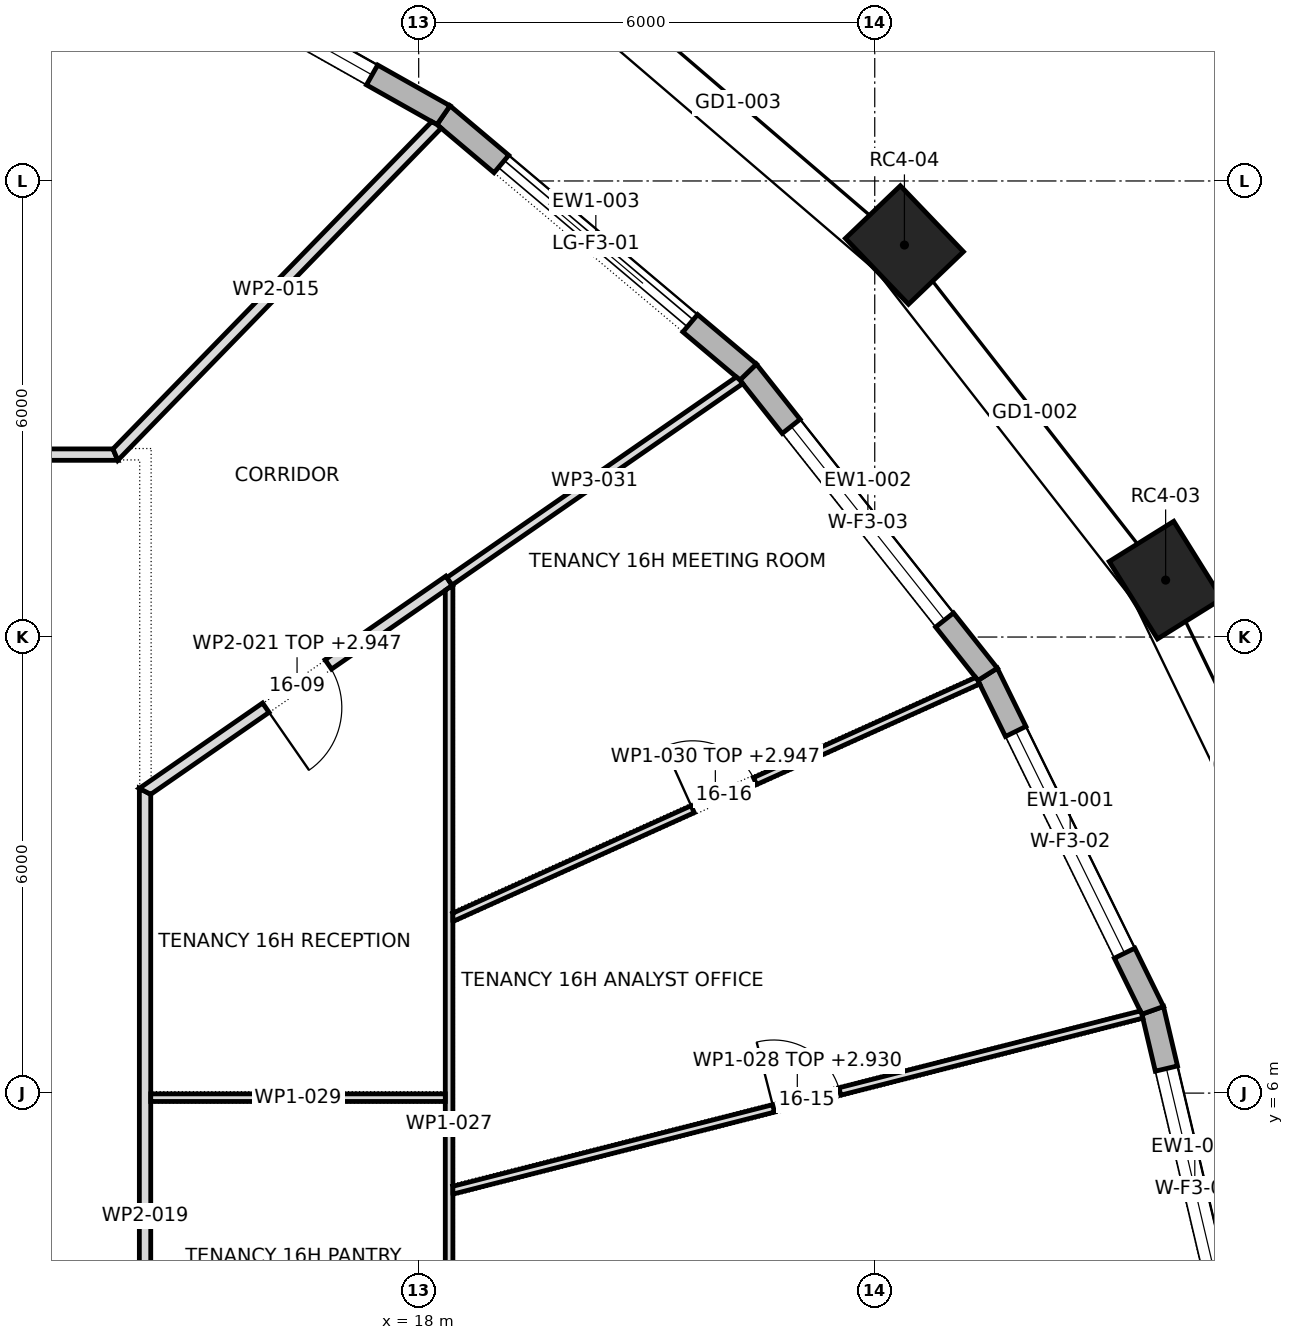
"""IFC4 building model, lengths in metres.
Left out: names, types, materials, properties, quantities, classifications, styles, units other than length and angle.
Written with IfcOpenShell. Run it as: python <this file> out.ifc"""

import sys

from ifc_helpers import new_model, si_unit, direction, frame, frame_2d, origin, origin_2d, place, context, subcontext, project, spatial, polyline, rectangle, outline, extrude, element, fill, save


model = new_model("IFC4")
c1 = context("Model", 3, precision=1e-05, world=origin(), true_north=direction((0.0, 1.0)))
c2 = subcontext(c1, "Body", "Model", "MODEL_VIEW")
j1 = project(units=[si_unit("LENGTHUNIT", "METRE"), si_unit("PLANEANGLEUNIT", "RADIAN")], contexts=[c1])
p1 = place(None, origin())
s1 = spatial("IfcSite", under=j1, at=p1, CompositionType="ELEMENT")
p2 = place(p1, origin())
s2 = spatial("IfcBuilding", under=s1, at=p2, CompositionType="ELEMENT")
p3 = place(p2, frame((0.0, 0.0, 226.9)))
s3 = spatial("IfcBuildingStorey", under=s2, at=p3, CompositionType="ELEMENT", Elevation=226.9)
for number, where, z_axis, x_axis in (
    (1, (27.827, 12.749, 0.0), (0.0, 0.0, 1.0), (-0.529, 0.849, 0.0)),
    (2, (24.39, 17.157, 0.0), (0.0, 0.0, 1.0), (-0.692, 0.722, 0.0)),
):
    element("IfcColumn", number, at=place(p3, frame(where, z_axis=z_axis, x_axis=x_axis)), inside=s3, PredefinedType="COLUMN", context=c2, shape_type="SweptSolid", body=[
        extrude(rectangle(XDim=1.2, YDim=1.0, at=origin_2d()), origin(), (0.0, 0.0, 1.0), 4.0),
    ])
p4 = place(p3, frame((28.764, 2.394, 0.0), z_axis=(0.0, 0.0, 1.0), x_axis=(-0.229617574796, 0.97328093033, 0.0)))
e3 = element("IfcWall", 3, at=p4, inside=s3, PredefinedType="STANDARD", context=c2, shape_type="SweptSolid", body=[
    extrude(outline(polyline([(-0.017, -0.15), (4.841, -0.15), (4.807, 0.15), (0.017, 0.15), (-0.017, -0.15)])), origin(), (0.0, 0.0, 1.0), 3.7),
])
p5 = place(p4, frame((0.787, 0.0, 0.6)))
e4 = element("IfcOpeningElement", 4, at=p5, cuts=e3, PredefinedType="OPENING", context=c2, shape_type="SweptSolid", body=[
    extrude(rectangle(XDim=3.25, YDim=2.65, at=frame_2d((1.625, 1.325))), frame((0.0, 0.162, 0.0), z_axis=(0.0, -1.0, 0.0), x_axis=(1.0, 0.0, 0.0)), (0.0, 0.0, 1.0), 0.324),
])
p6 = place(p3, frame((27.656, 7.089, 0.0), z_axis=(0.0, 0.0, 1.0), x_axis=(-0.440857641837, 0.897577038272, 0.0)))
e5 = element("IfcWall", 5, at=p6, inside=s3, PredefinedType="STANDARD", context=c2, shape_type="SweptSolid", body=[
    extrude(outline(polyline([(-0.017, -0.15), (4.941, -0.15), (4.909, 0.15), (0.017, 0.15), (-0.017, -0.15)])), origin(), (0.0, 0.0, 1.0), 3.7),
])
p7 = place(p6, frame((0.838, 0.0, 0.6)))
e6 = element("IfcOpeningElement", 6, at=p7, cuts=e5, PredefinedType="OPENING", context=c2, shape_type="SweptSolid", body=[
    extrude(rectangle(XDim=3.25, YDim=2.65, at=frame_2d((1.625, 1.325))), frame((0.0, 0.162, 0.0), z_axis=(0.0, -1.0, 0.0), x_axis=(1.0, 0.0, 0.0)), (0.0, 0.0, 1.0), 0.324),
])
p8 = place(p3, frame((25.485, 11.51, 0.0), z_axis=(0.0, 0.0, 1.0), x_axis=(-0.621084984443, 0.783743224596, 0.0)))
e7 = element("IfcWall", 7, at=p8, inside=s3, PredefinedType="STANDARD", context=c2, shape_type="SweptSolid", body=[
    extrude(outline(polyline([(-0.016, -0.15), (5.088, -0.15), (5.058, 0.15), (0.016, 0.15), (-0.016, -0.15)])), origin(), (0.0, 0.0, 1.0), 3.7),
])
p9 = place(p8, frame((0.912, 0.0, 0.6)))
e8 = element("IfcOpeningElement", 8, at=p9, cuts=e7, PredefinedType="OPENING", context=c2, shape_type="SweptSolid", body=[
    extrude(rectangle(XDim=3.25, YDim=2.65, at=frame_2d((1.625, 1.325))), frame((0.0, 0.162, 0.0), z_axis=(0.0, -1.0, 0.0), x_axis=(1.0, 0.0, 0.0)), (0.0, 0.0, 1.0), 0.324),
])
p10 = place(p3, frame((22.334, 15.486, 0.0), z_axis=(0.0, 0.0, 1.0), x_axis=(-0.764475071601, 0.644653290459, 0.0)))
e9 = element("IfcWall", 9, at=p10, inside=s3, PredefinedType="STANDARD", context=c2, shape_type="SweptSolid", body=[
    extrude(outline(polyline([(-0.015, -0.15), (5.257, -0.15), (5.229, 0.15), (0.015, 0.15), (-0.015, -0.15)])), origin(), (0.0, 0.0, 1.0), 3.7),
])
p11 = place(p10, frame((0.996, 0.0, 0.0)))
e10 = element("IfcOpeningElement", 10, at=p11, cuts=e9, PredefinedType="OPENING", context=c2, shape_type="SweptSolid", body=[
    extrude(rectangle(XDim=3.25, YDim=3.25, at=frame_2d((1.625, 1.625))), frame((0.0, 0.162, 0.0), z_axis=(0.0, -1.0, 0.0), x_axis=(1.0, 0.0, 0.0)), (0.0, 0.0, 1.0), 0.324),
])
p12 = place(p3, frame((18.326, 18.865, 0.0), z_axis=(0.0, 0.0, 1.0), x_axis=(-0.871225596594, 0.490882837181, 0.0)))
e11 = element("IfcWall", 11, at=p12, inside=s3, PredefinedType="STANDARD", context=c2, shape_type="SweptSolid", body=[
    extrude(outline(polyline([(-0.014, -0.15), (5.42, -0.15), (5.393, 0.15), (0.014, 0.15), (-0.014, -0.15)])), origin(), (0.0, 0.0, 1.0), 3.7),
])
p13 = place(p12, frame((1.078, 0.0, 0.6)))
e12 = element("IfcOpeningElement", 12, at=p13, cuts=e11, PredefinedType="OPENING", context=c2, shape_type="SweptSolid", body=[
    extrude(rectangle(XDim=3.25, YDim=2.65, at=frame_2d((1.625, 1.325))), frame((0.0, 0.162, 0.0), z_axis=(0.0, -1.0, 0.0), x_axis=(1.0, 0.0, 0.0)), (0.0, 0.0, 1.0), 0.324),
])
p14 = place(p3, frame((-14.042, 14.4, 0.0), z_axis=(0.0, 0.0, 1.0), x_axis=(1.0, 0.0, 0.0)))
e13 = element("IfcWall", 13, at=p14, inside=s3, PredefinedType="PARTITIONING", context=c2, shape_type="SweptSolid", body=[
    extrude(outline(polyline([(0.0, -0.075), (1.872, -0.075), (3.745, -0.075), (5.617, -0.075), (7.489, -0.075), (9.361, -0.075), (11.233, -0.075), (13.106, -0.075), (14.978, -0.075), (16.85, -0.075), (18.722, -0.075), (20.594, -0.075), (22.467, -0.075), (24.339, -0.075), (26.211, -0.075), (28.083, -0.075), (28.02, 0.075), (26.023, 0.075), (24.026, 0.075), (22.029, 0.075), (20.032, 0.075), (18.036, 0.075), (16.039, 0.075), (14.042, 0.075), (12.045, 0.075), (10.048, 0.075), (8.051, 0.075), (6.054, 0.075), (4.057, 0.075), (2.06, 0.075), (0.063, 0.075), (0.0, -0.075)])), origin(), (0.0, 0.0, 1.0), 3.7),
])
p15 = place(p14, frame((13.142, 0.0, 0.0)))
e14 = element("IfcOpeningElement", 14, at=p15, cuts=e13, PredefinedType="OPENING", context=c2, shape_type="SweptSolid", body=[
    extrude(rectangle(XDim=1.8, YDim=2.1, at=frame_2d((0.9, 1.05))), frame((0.0, 0.087, 0.0), z_axis=(0.0, -1.0, 0.0), x_axis=(1.0, 0.0, 0.0)), (0.0, 0.0, 1.0), 0.174),
])
p16 = place(p3, frame((13.988, 14.377, 0.0), z_axis=(0.0, 0.0, 1.0), x_axis=(0.697616683155, 0.716471188105, 0.0)))
e15 = element("IfcWall", 15, at=p16, inside=s3, PredefinedType="PARTITIONING", context=c2, shape_type="SweptSolid", body=[
    extrude(outline(polyline([(6.099, -0.075), (6.099, -0.073), (6.094, -0.002), (6.073, 0.075), (4.571, 0.075), (3.068, 0.075), (1.566, 0.075), (0.063, 0.075), (0.032, 0.0), (0.0, -0.075), (1.525, -0.075), (3.05, -0.075), (4.574, -0.075), (6.099, -0.075)])), origin(), (0.0, 0.0, 1.0), 3.7),
])
p17 = place(p3, frame((14.4, -1.2, 0.0), z_axis=(0.0, 0.0, 1.0), x_axis=(0.0, 1.0, 0.0)))
e16 = element("IfcWall", 16, at=p17, inside=s3, PredefinedType="PARTITIONING", context=c2, shape_type="SweptSolid", body=[
    extrude(outline(polyline([(0.0, -0.075), (1.855, -0.075), (3.71, -0.075), (5.565, -0.075), (7.42, -0.075), (9.276, -0.075), (11.131, -0.075), (11.209, 0.075), (11.209, 0.075), (9.341, 0.075), (7.473, 0.075), (5.604, 0.075), (3.736, 0.075), (1.868, 0.075), (0.0, 0.075), (0.0, -0.075)])), origin(), (0.0, 0.0, 1.0), 3.7),
])
p18 = place(p17, frame((3.07, 0.0, 0.0)))
e17 = element("IfcOpeningElement", 17, at=p18, cuts=e16, PredefinedType="OPENING", context=c2, shape_type="SweptSolid", body=[
    extrude(rectangle(XDim=1.0, YDim=2.1, at=frame_2d((0.5, 1.05))), frame((0.0, 0.087, 0.0), z_axis=(0.0, -1.0, 0.0), x_axis=(1.0, 0.0, 0.0)), (0.0, 0.0, 1.0), 0.174),
])
p19 = place(p3, frame((14.368, 9.948, 0.0), z_axis=(0.0, 0.0, 1.0), x_axis=(0.822102584422, 0.56933938972, 0.0)))
e18 = element("IfcWall", 18, at=p19, inside=s3, PredefinedType="PARTITIONING", context=c2, shape_type="SweptSolid", body=[
    extrude(outline(polyline([(4.905, 0.075), (3.27, 0.075), (1.635, 0.075), (0.0, 0.075), (0.079, -0.075), (1.688, -0.075), (3.296, -0.075), (4.905, -0.075), (4.905, 0.075)])), origin(), (0.0, 0.0, 1.0), 2.947),
])
p20 = place(p19, frame((1.972, 0.0, 0.0)))
e19 = element("IfcOpeningElement", 19, at=p20, cuts=e18, PredefinedType="OPENING", context=c2, shape_type="SweptSolid", body=[
    extrude(rectangle(XDim=1.0, YDim=2.1, at=frame_2d((0.5, 1.05))), frame((0.0, 0.087, 0.0), z_axis=(0.0, -1.0, 0.0), x_axis=(1.0, 0.0, 0.0)), (0.0, 0.0, 1.0), 0.174),
])
p21 = place(p3, frame((18.4, -1.459, 0.0), z_axis=(0.0, 0.0, 1.0), x_axis=(0.0, 1.0, 0.0)))
e20 = element("IfcWall", 20, at=p21, inside=s3, PredefinedType="PARTITIONING", context=c2, shape_type="SweptSolid", body=[
    extrude(outline(polyline([(0.0, -0.05), (1.557, -0.05), (3.113, -0.05), (4.67, -0.05), (6.227, -0.05), (6.233, -0.048), (6.234, -0.05), (8.027, -0.05), (9.821, -0.05), (9.826, -0.048), (9.827, -0.05), (11.268, -0.05), (12.709, -0.05), (14.151, -0.05), (14.151, -0.05), (14.145, -0.04), (14.151, -0.036), (14.151, -0.034), (14.138, -0.043), (14.073, 0.05), (12.417, 0.05), (10.761, 0.05), (9.105, 0.05), (7.449, 0.05), (7.449, 0.05), (7.349, 0.05), (7.349, 0.05), (5.514, 0.05), (3.679, 0.05), (1.844, 0.05), (0.008, 0.05), (0.0, -0.048), (0.0, -0.05)])), origin(), (0.0, 0.0, 1.0), 3.7),
])
p22 = place(p21, frame((2.6, 0.0, 0.0)))
e21 = element("IfcOpeningElement", 21, at=p22, cuts=e20, PredefinedType="OPENING", context=c2, shape_type="SweptSolid", body=[
    extrude(rectangle(XDim=0.9, YDim=2.1, at=frame_2d((0.45, 1.05))), frame((0.0, 0.062, 0.0), z_axis=(0.0, -1.0, 0.0), x_axis=(1.0, 0.0, 0.0)), (0.0, 0.0, 1.0), 0.124),
])
p23 = place(p3, frame((18.438, 4.719, 0.0), z_axis=(0.0, 0.0, 1.0), x_axis=(0.968975503795, 0.247156778269, 0.0)))
e22 = element("IfcWall", 22, at=p23, inside=s3, PredefinedType="PARTITIONING", context=c2, shape_type="SweptSolid", body=[
    extrude(outline(polyline([(9.367, -0.05), (9.367, 0.008), (9.358, 0.05), (7.492, 0.05), (5.625, 0.05), (3.759, 0.05), (1.892, 0.05), (0.025, 0.05), (0.0, -0.05), (0.0, -0.05), (1.874, -0.05), (3.747, -0.05), (5.62, -0.05), (7.494, -0.05), (9.367, -0.05)])), origin(), (0.0, 0.0, 1.0), 2.93),
])
p24 = place(p23, frame((4.367, 0.0, 0.0)))
e23 = element("IfcOpeningElement", 23, at=p24, cuts=e22, PredefinedType="OPENING", context=c2, shape_type="SweptSolid", body=[
    extrude(rectangle(XDim=0.9, YDim=2.1, at=frame_2d((0.45, 1.05))), frame((0.0, 0.062, 0.0), z_axis=(0.0, -1.0, 0.0), x_axis=(1.0, 0.0, 0.0)), (0.0, 0.0, 1.0), 0.124),
])
p25 = place(p3, frame((18.35, 5.94, 0.0), z_axis=(0.0, 0.0, 1.0), x_axis=(-1.0, 0.0, 0.0)))
e24 = element("IfcWall", 24, at=p25, inside=s3, PredefinedType="PARTITIONING", context=c2, shape_type="SweptSolid", body=[
    extrude(rectangle(XDim=3.875, YDim=0.1, at=frame_2d((1.938, 0.0))), origin(), (0.0, 0.0, 1.0), 3.7),
])
p26 = place(p3, frame((18.43, 8.303, 0.0), z_axis=(0.0, 0.0, 1.0), x_axis=(0.911623805038, 0.411025592985, 0.0)))
e25 = element("IfcWall", 25, at=p26, inside=s3, PredefinedType="PARTITIONING", context=c2, shape_type="SweptSolid", body=[
    extrude(outline(polyline([(7.602, -0.05), (7.602, -0.045), (7.6, 0.002), (7.588, 0.05), (5.702, 0.05), (3.816, 0.05), (1.931, 0.05), (0.045, 0.05), (0.0, -0.049), (0.0, -0.05), (1.9, -0.05), (3.801, -0.05), (5.701, -0.05), (7.602, -0.05)])), origin(), (0.0, 0.0, 1.0), 2.947),
])
p27 = place(p26, frame((3.483, 0.0, 0.0)))
e26 = element("IfcOpeningElement", 26, at=p27, cuts=e25, PredefinedType="OPENING", context=c2, shape_type="SweptSolid", body=[
    extrude(rectangle(XDim=0.9, YDim=2.1, at=frame_2d((0.45, 1.05))), frame((0.0, 0.062, 0.0), z_axis=(0.0, -1.0, 0.0), x_axis=(1.0, 0.0, 0.0)), (0.0, 0.0, 1.0), 0.124),
])
p28 = place(p3, frame((18.405, 12.733, 0.0), z_axis=(0.0, 0.0, 1.0), x_axis=(0.821978662859, 0.569518285751, 0.0)))
e27 = element("IfcWall", 27, at=p28, inside=s3, PredefinedType="PARTITIONING", context=c2, shape_type="SweptSolid", body=[
    extrude(outline(polyline([(4.652, -0.06), (4.652, -0.055), (4.649, 0.0), (4.633, 0.06), (3.088, 0.06), (1.544, 0.06), (0.0, 0.06), (0.0, -0.051), (0.013, -0.06), (1.56, -0.06), (3.106, -0.06), (4.652, -0.06)])), origin(), (0.0, 0.0, 1.0), 3.7),
])
p29 = place(p5, origin())
e28 = element("IfcWindow", 28, at=p29, inside=s3, PartitioningType="TRIPLE_PANEL_VERTICAL", PredefinedType="WINDOW", context=c2, shape_type="SweptSolid", body=[
    extrude(rectangle(XDim=3.25, YDim=2.65, at=frame_2d((1.625, 1.325))), frame((0.0, 0.03, 0.0), z_axis=(0.0, -1.0, 0.0), x_axis=(1.0, 0.0, 0.0)), (0.0, 0.0, 1.0), 0.06),
])
fill(e4, e28)
p30 = place(p7, origin())
e29 = element("IfcWindow", 29, at=p30, inside=s3, PartitioningType="TRIPLE_PANEL_VERTICAL", PredefinedType="WINDOW", context=c2, shape_type="SweptSolid", body=[
    extrude(rectangle(XDim=3.25, YDim=2.65, at=frame_2d((1.625, 1.325))), frame((0.0, 0.03, 0.0), z_axis=(0.0, -1.0, 0.0), x_axis=(1.0, 0.0, 0.0)), (0.0, 0.0, 1.0), 0.06),
])
fill(e6, e29)
p31 = place(p9, origin())
e30 = element("IfcWindow", 30, at=p31, inside=s3, PartitioningType="TRIPLE_PANEL_VERTICAL", PredefinedType="WINDOW", context=c2, shape_type="SweptSolid", body=[
    extrude(rectangle(XDim=3.25, YDim=2.65, at=frame_2d((1.625, 1.325))), frame((0.0, 0.03, 0.0), z_axis=(0.0, -1.0, 0.0), x_axis=(1.0, 0.0, 0.0)), (0.0, 0.0, 1.0), 0.06),
])
fill(e8, e30)
p32 = place(p11, origin())
e31 = element("IfcDoor", 31, at=p32, inside=s3, OperationType="DOUBLE_DOOR_SLIDING", PredefinedType="DOOR", context=c2, shape_type="SweptSolid", body=[
    extrude(rectangle(XDim=3.25, YDim=3.25, at=frame_2d((1.625, 1.625))), frame((0.0, 0.025, 0.0), z_axis=(0.0, -1.0, 0.0), x_axis=(1.0, 0.0, 0.0)), (0.0, 0.0, 1.0), 0.05),
])
fill(e10, e31)
p33 = place(p13, origin())
e32 = element("IfcWindow", 32, at=p33, inside=s3, PartitioningType="TRIPLE_PANEL_VERTICAL", PredefinedType="WINDOW", context=c2, shape_type="SweptSolid", body=[
    extrude(rectangle(XDim=3.25, YDim=2.65, at=frame_2d((1.625, 1.325))), frame((0.0, 0.03, 0.0), z_axis=(0.0, -1.0, 0.0), x_axis=(1.0, 0.0, 0.0)), (0.0, 0.0, 1.0), 0.06),
])
fill(e12, e32)
p34 = place(p20, frame((1.0, 0.0, 0.0), z_axis=(0.0, 0.0, 1.0), x_axis=(-1.0, 0.0, 0.0)))
e33 = element("IfcDoor", 33, at=p34, inside=s3, OperationType="SINGLE_SWING_LEFT", PredefinedType="DOOR", context=c2, shape_type="SweptSolid", body=[
    extrude(rectangle(XDim=1.0, YDim=2.1, at=frame_2d((0.5, 1.05))), frame((0.0, 0.025, 0.0), z_axis=(0.0, -1.0, 0.0), x_axis=(1.0, 0.0, 0.0)), (0.0, 0.0, 1.0), 0.05),
])
fill(e19, e33)
p35 = place(p24, origin())
e34 = element("IfcDoor", 34, at=p35, inside=s3, OperationType="SINGLE_SWING_RIGHT", PredefinedType="DOOR", context=c2, shape_type="SweptSolid", body=[
    extrude(rectangle(XDim=0.9, YDim=2.1, at=frame_2d((0.45, 1.05))), frame((0.0, 0.025, 0.0), z_axis=(0.0, -1.0, 0.0), x_axis=(1.0, 0.0, 0.0)), (0.0, 0.0, 1.0), 0.05),
])
fill(e23, e34)
p36 = place(p27, origin())
e35 = element("IfcDoor", 35, at=p36, inside=s3, OperationType="SINGLE_SWING_RIGHT", PredefinedType="DOOR", context=c2, shape_type="SweptSolid", body=[
    extrude(rectangle(XDim=0.9, YDim=2.1, at=frame_2d((0.45, 1.05))), frame((0.0, 0.025, 0.0), z_axis=(0.0, -1.0, 0.0), x_axis=(1.0, 0.0, 0.0)), (0.0, 0.0, 1.0), 0.05),
])
fill(e26, e35)
save(model, sys.argv[1])
